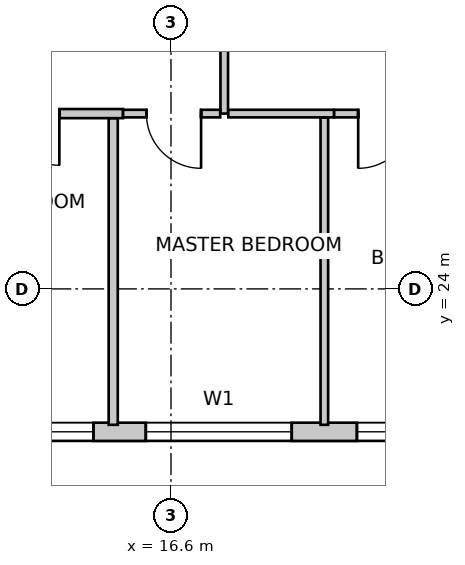
"""IFC4 building model, lengths in metres.
Left out: names, types, materials, properties, quantities, classifications, styles, units other than length and angle.
Written with IfcOpenShell. Run it as: python <this file> out.ifc"""

import sys

from ifc_helpers import new_model, si_unit, direction, frame, frame_2d, origin, place, context, subcontext, project, spatial, rectangle, extrude, source, transform, mapped, element, fill, save


model = new_model("IFC4")
c1 = context("Model", 3, precision=1e-05, world=origin(), true_north=direction((0.0, 1.0)))
c2 = subcontext(c1, "Body", "Model", "MODEL_VIEW")
j1 = project(units=[si_unit("LENGTHUNIT", "METRE"), si_unit("PLANEANGLEUNIT", "RADIAN")], contexts=[c1])
p1 = place(None, origin())
s1 = spatial("IfcSite", under=j1, at=p1, CompositionType="ELEMENT")
p2 = place(p1, origin())
s2 = spatial("IfcBuilding", under=s1, at=p2, CompositionType="ELEMENT")
p3 = place(p2, frame((0.0, 0.0, 281.7)))
s3 = spatial("IfcBuildingStorey", under=s2, at=p3, CompositionType="ELEMENT", Elevation=281.7)
p4 = place(p3, frame((12.086, 21.65, 0.0), z_axis=(0.0, 0.0, 1.0), x_axis=(1.0, 0.0, 0.0)))
e1 = element("IfcWall", 1, at=p4, inside=s3, PredefinedType="SOLIDWALL", context=c2, shape_type="SweptSolid", body=[
    extrude(rectangle(XDim=10.642, YDim=0.3, at=frame_2d((5.321, 0.0))), origin(), (0.0, 0.0, 1.0), 3.35),
])
m1 = source(origin(), c2, "Body", "SweptSolid", [
    extrude(rectangle(XDim=2.1, YDim=2.0, at=frame_2d((1.05, 1.0))), frame((0.0, 0.16, 0.0), z_axis=(0.0, -1.0, 0.0), x_axis=(1.0, 0.0, 0.0)), (0.0, 0.0, 1.0), 0.32),
])
p5 = place(p4, frame((1.139, 0.0, 0.85)))
e2 = element("IfcOpeningElement", 2, at=p5, cuts=e1, PredefinedType="OPENING", context=c2, shape_type="MappedRepresentation", body=[
    mapped(m1, transform((0.0, 0.0, 0.0), scale=1.0)),
])
m2 = source(origin(), c2, "Body", "SweptSolid", [
    extrude(rectangle(XDim=2.4, YDim=2.2, at=frame_2d((1.2, 1.1))), frame((0.0, 0.16, 0.0), z_axis=(0.0, -1.0, 0.0), x_axis=(1.0, 0.0, 0.0)), (0.0, 0.0, 1.0), 0.32),
])
p6 = place(p4, frame((4.1, 0.0, 0.85)))
e3 = element("IfcOpeningElement", 3, at=p6, cuts=e1, PredefinedType="OPENING", context=c2, shape_type="MappedRepresentation", body=[
    mapped(m2, transform((0.0, 0.0, 0.0), scale=1.0)),
])
p7 = place(p4, frame((7.572, 0.0, 0.85)))
e4 = element("IfcOpeningElement", 4, at=p7, cuts=e1, PredefinedType="OPENING", context=c2, shape_type="MappedRepresentation", body=[
    mapped(m2, transform((0.0, 0.0, 0.0), scale=1.0)),
])
p8 = place(p3, frame((17.476, 31.906, 0.0), z_axis=(0.0, 0.0, 1.0), x_axis=(0.0, -1.0, 0.0)))
e5 = element("IfcWall", 5, at=p8, inside=s3, PredefinedType="PARTITIONING", context=c2, shape_type="SweptSolid", body=[
    extrude(rectangle(XDim=5.023, YDim=0.125, at=frame_2d((2.511, 0.0))), origin(), (0.0, 0.0, 1.0), 2.935),
])
m3 = source(origin(), c2, "Body", "SweptSolid", [
    extrude(rectangle(XDim=0.85, YDim=2.15, at=frame_2d((0.425, 1.075))), frame((0.0, 0.073, 0.0), z_axis=(0.0, -1.0, 0.0), x_axis=(1.0, 0.0, 0.0)), (0.0, 0.0, 1.0), 0.145),
])
p9 = place(p8, frame((2.086, 0.0, 0.0)))
e6 = element("IfcOpeningElement", 6, at=p9, cuts=e5, PredefinedType="OPENING", context=c2, shape_type="MappedRepresentation", body=[
    mapped(m3, transform((0.0, 0.0, 0.0), scale=1.0)),
])
p10 = place(p3, frame((15.81, 26.883, 0.0), z_axis=(0.0, 0.0, 1.0), x_axis=(-1.0, 0.0, 0.0)))
e7 = element("IfcWall", 7, at=p10, inside=s3, PredefinedType="PARTITIONING", context=c2, shape_type="SweptSolid", body=[
    extrude(rectangle(XDim=3.07, YDim=0.15, at=frame_2d((1.535, 0.0))), origin(), (0.0, 0.0, 1.0), 2.935),
])
m4 = source(origin(), c2, "Body", "SweptSolid", [
    extrude(rectangle(XDim=0.85, YDim=2.15, at=frame_2d((0.425, 1.075))), frame((0.0, 0.085, 0.0), z_axis=(0.0, -1.0, 0.0), x_axis=(1.0, 0.0, 0.0)), (0.0, 0.0, 1.0), 0.17),
])
p11 = place(p10, frame((1.046, 0.0, 0.0)))
e8 = element("IfcOpeningElement", 8, at=p11, cuts=e7, PredefinedType="OPENING", context=c2, shape_type="MappedRepresentation", body=[
    mapped(m4, transform((0.0, 0.0, 0.0), scale=1.0)),
])
p12 = place(p3, frame((17.409, 26.883, 0.0), z_axis=(0.0, 0.0, 1.0), x_axis=(-1.0, 0.0, 0.0)))
e9 = element("IfcWall", 9, at=p12, inside=s3, PredefinedType="PARTITIONING", context=c2, shape_type="SweptSolid", body=[
    extrude(rectangle(XDim=1.597, YDim=0.125, at=frame_2d((0.799, 0.0))), origin(), (0.0, 0.0, 1.0), 2.935),
])
m5 = source(origin(), c2, "Body", "SweptSolid", [
    extrude(rectangle(XDim=0.9, YDim=2.15, at=frame_2d((0.45, 1.075))), frame((0.0, 0.073, 0.0), z_axis=(0.0, -1.0, 0.0), x_axis=(1.0, 0.0, 0.0)), (0.0, 0.0, 1.0), 0.145),
])
p13 = place(p12, frame((0.314, 0.0, 0.0)))
e10 = element("IfcOpeningElement", 10, at=p13, cuts=e9, PredefinedType="OPENING", context=c2, shape_type="MappedRepresentation", body=[
    mapped(m5, transform((0.0, 0.0, 0.0), scale=1.0)),
])
p14 = place(p3, frame((19.282, 26.883, 0.0), z_axis=(0.0, 0.0, 1.0), x_axis=(-1.0, 0.0, 0.0)))
e11 = element("IfcWall", 11, at=p14, inside=s3, PredefinedType="PARTITIONING", context=c2, shape_type="SweptSolid", body=[
    extrude(rectangle(XDim=1.74, YDim=0.125, at=frame_2d((0.87, 0.0))), origin(), (0.0, 0.0, 1.0), 3.35),
])
p15 = place(p3, frame((20.927, 26.883, 0.0), z_axis=(0.0, 0.0, 1.0), x_axis=(-1.0, 0.0, 0.0)))
e12 = element("IfcWall", 12, at=p15, inside=s3, PredefinedType="PARTITIONING", context=c2, shape_type="SweptSolid", body=[
    extrude(rectangle(XDim=1.644, YDim=0.125, at=frame_2d((0.822, 0.0))), origin(), (0.0, 0.0, 1.0), 3.35),
])
p16 = place(p15, frame((0.349, 0.0, 0.0)))
e13 = element("IfcOpeningElement", 13, at=p16, cuts=e12, PredefinedType="OPENING", context=c2, shape_type="MappedRepresentation", body=[
    mapped(m5, transform((0.0, 0.0, 0.0), scale=1.0)),
])
p17 = place(p3, frame((15.65, 26.804, 0.0), z_axis=(0.0, 0.0, 1.0), x_axis=(0.0, -1.0, 0.0)))
e14 = element("IfcWall", 14, at=p17, inside=s3, PredefinedType="PARTITIONING", context=c2, shape_type="SweptSolid", body=[
    extrude(rectangle(XDim=5.039, YDim=0.15, at=frame_2d((2.52, 0.0))), origin(), (0.0, 0.0, 1.0), 3.35),
])
p18 = place(p3, frame((19.122, 26.816, 0.0), z_axis=(0.0, 0.0, 1.0), x_axis=(0.0, -1.0, 0.0)))
e15 = element("IfcWall", 15, at=p18, inside=s3, PredefinedType="PARTITIONING", context=c2, shape_type="SweptSolid", body=[
    extrude(rectangle(XDim=5.052, YDim=0.125, at=frame_2d((2.526, 0.0))), origin(), (0.0, 0.0, 1.0), 2.935),
])
m6 = source(origin(), c2, "Body", "SweptSolid", [
    extrude(rectangle(XDim=2.1, YDim=2.0, at=frame_2d((1.05, 1.0))), frame((0.0, -0.015, 0.0), z_axis=(0.0, -1.0, 0.0), x_axis=(1.0, 0.0, 0.0)), (0.0, 0.0, 1.0), 0.06),
])
p19 = place(p5, origin())
e16 = element("IfcWindow", 16, at=p19, inside=s3, PartitioningType="SINGLE_PANEL", PredefinedType="WINDOW", context=c2, shape_type="MappedRepresentation", body=[
    mapped(m6, transform((0.0, 0.0, 0.0), scale=1.0)),
])
fill(e2, e16)
m7 = source(origin(), c2, "Body", "SweptSolid", [
    extrude(rectangle(XDim=2.4, YDim=2.2, at=frame_2d((1.2, 1.1))), frame((0.0, -0.015, 0.0), z_axis=(0.0, -1.0, 0.0), x_axis=(1.0, 0.0, 0.0)), (0.0, 0.0, 1.0), 0.06),
])
p20 = place(p6, origin())
e17 = element("IfcWindow", 17, at=p20, inside=s3, PartitioningType="SINGLE_PANEL", PredefinedType="WINDOW", context=c2, shape_type="MappedRepresentation", body=[
    mapped(m7, transform((0.0, 0.0, 0.0), scale=1.0)),
])
fill(e3, e17)
p21 = place(p7, origin())
e18 = element("IfcWindow", 18, at=p21, inside=s3, PartitioningType="SINGLE_PANEL", PredefinedType="WINDOW", context=c2, shape_type="MappedRepresentation", body=[
    mapped(m7, transform((0.0, 0.0, 0.0), scale=1.0)),
])
fill(e4, e18)
m8 = source(origin(), c2, "Body", "SweptSolid", [
    extrude(rectangle(XDim=0.85, YDim=2.15, at=frame_2d((0.425, 1.075))), frame((0.0, 0.025, 0.0), z_axis=(0.0, -1.0, 0.0), x_axis=(1.0, 0.0, 0.0)), (0.0, 0.0, 1.0), 0.05),
])
p22 = place(p11, origin())
e19 = element("IfcDoor", 19, at=p22, inside=s3, OperationType="SINGLE_SWING_LEFT", PredefinedType="DOOR", context=c2, shape_type="MappedRepresentation", body=[
    mapped(m8, transform((0.0, 0.0, 0.0), scale=1.0)),
])
fill(e8, e19)
m9 = source(origin(), c2, "Body", "SweptSolid", [
    extrude(rectangle(XDim=0.9, YDim=2.15, at=frame_2d((0.45, 1.075))), frame((0.0, 0.025, 0.0), z_axis=(0.0, -1.0, 0.0), x_axis=(1.0, 0.0, 0.0)), (0.0, 0.0, 1.0), 0.05),
])
p23 = place(p13, origin())
e20 = element("IfcDoor", 20, at=p23, inside=s3, OperationType="SINGLE_SWING_LEFT", PredefinedType="DOOR", context=c2, shape_type="MappedRepresentation", body=[
    mapped(m9, transform((0.0, 0.0, 0.0), scale=1.0)),
])
fill(e10, e20)
p24 = place(p16, origin())
e21 = element("IfcDoor", 21, at=p24, inside=s3, OperationType="SINGLE_SWING_RIGHT", PredefinedType="DOOR", context=c2, shape_type="MappedRepresentation", body=[
    mapped(m9, transform((0.0, 0.0, 0.0), scale=1.0)),
])
fill(e13, e21)
save(model, sys.argv[1])
